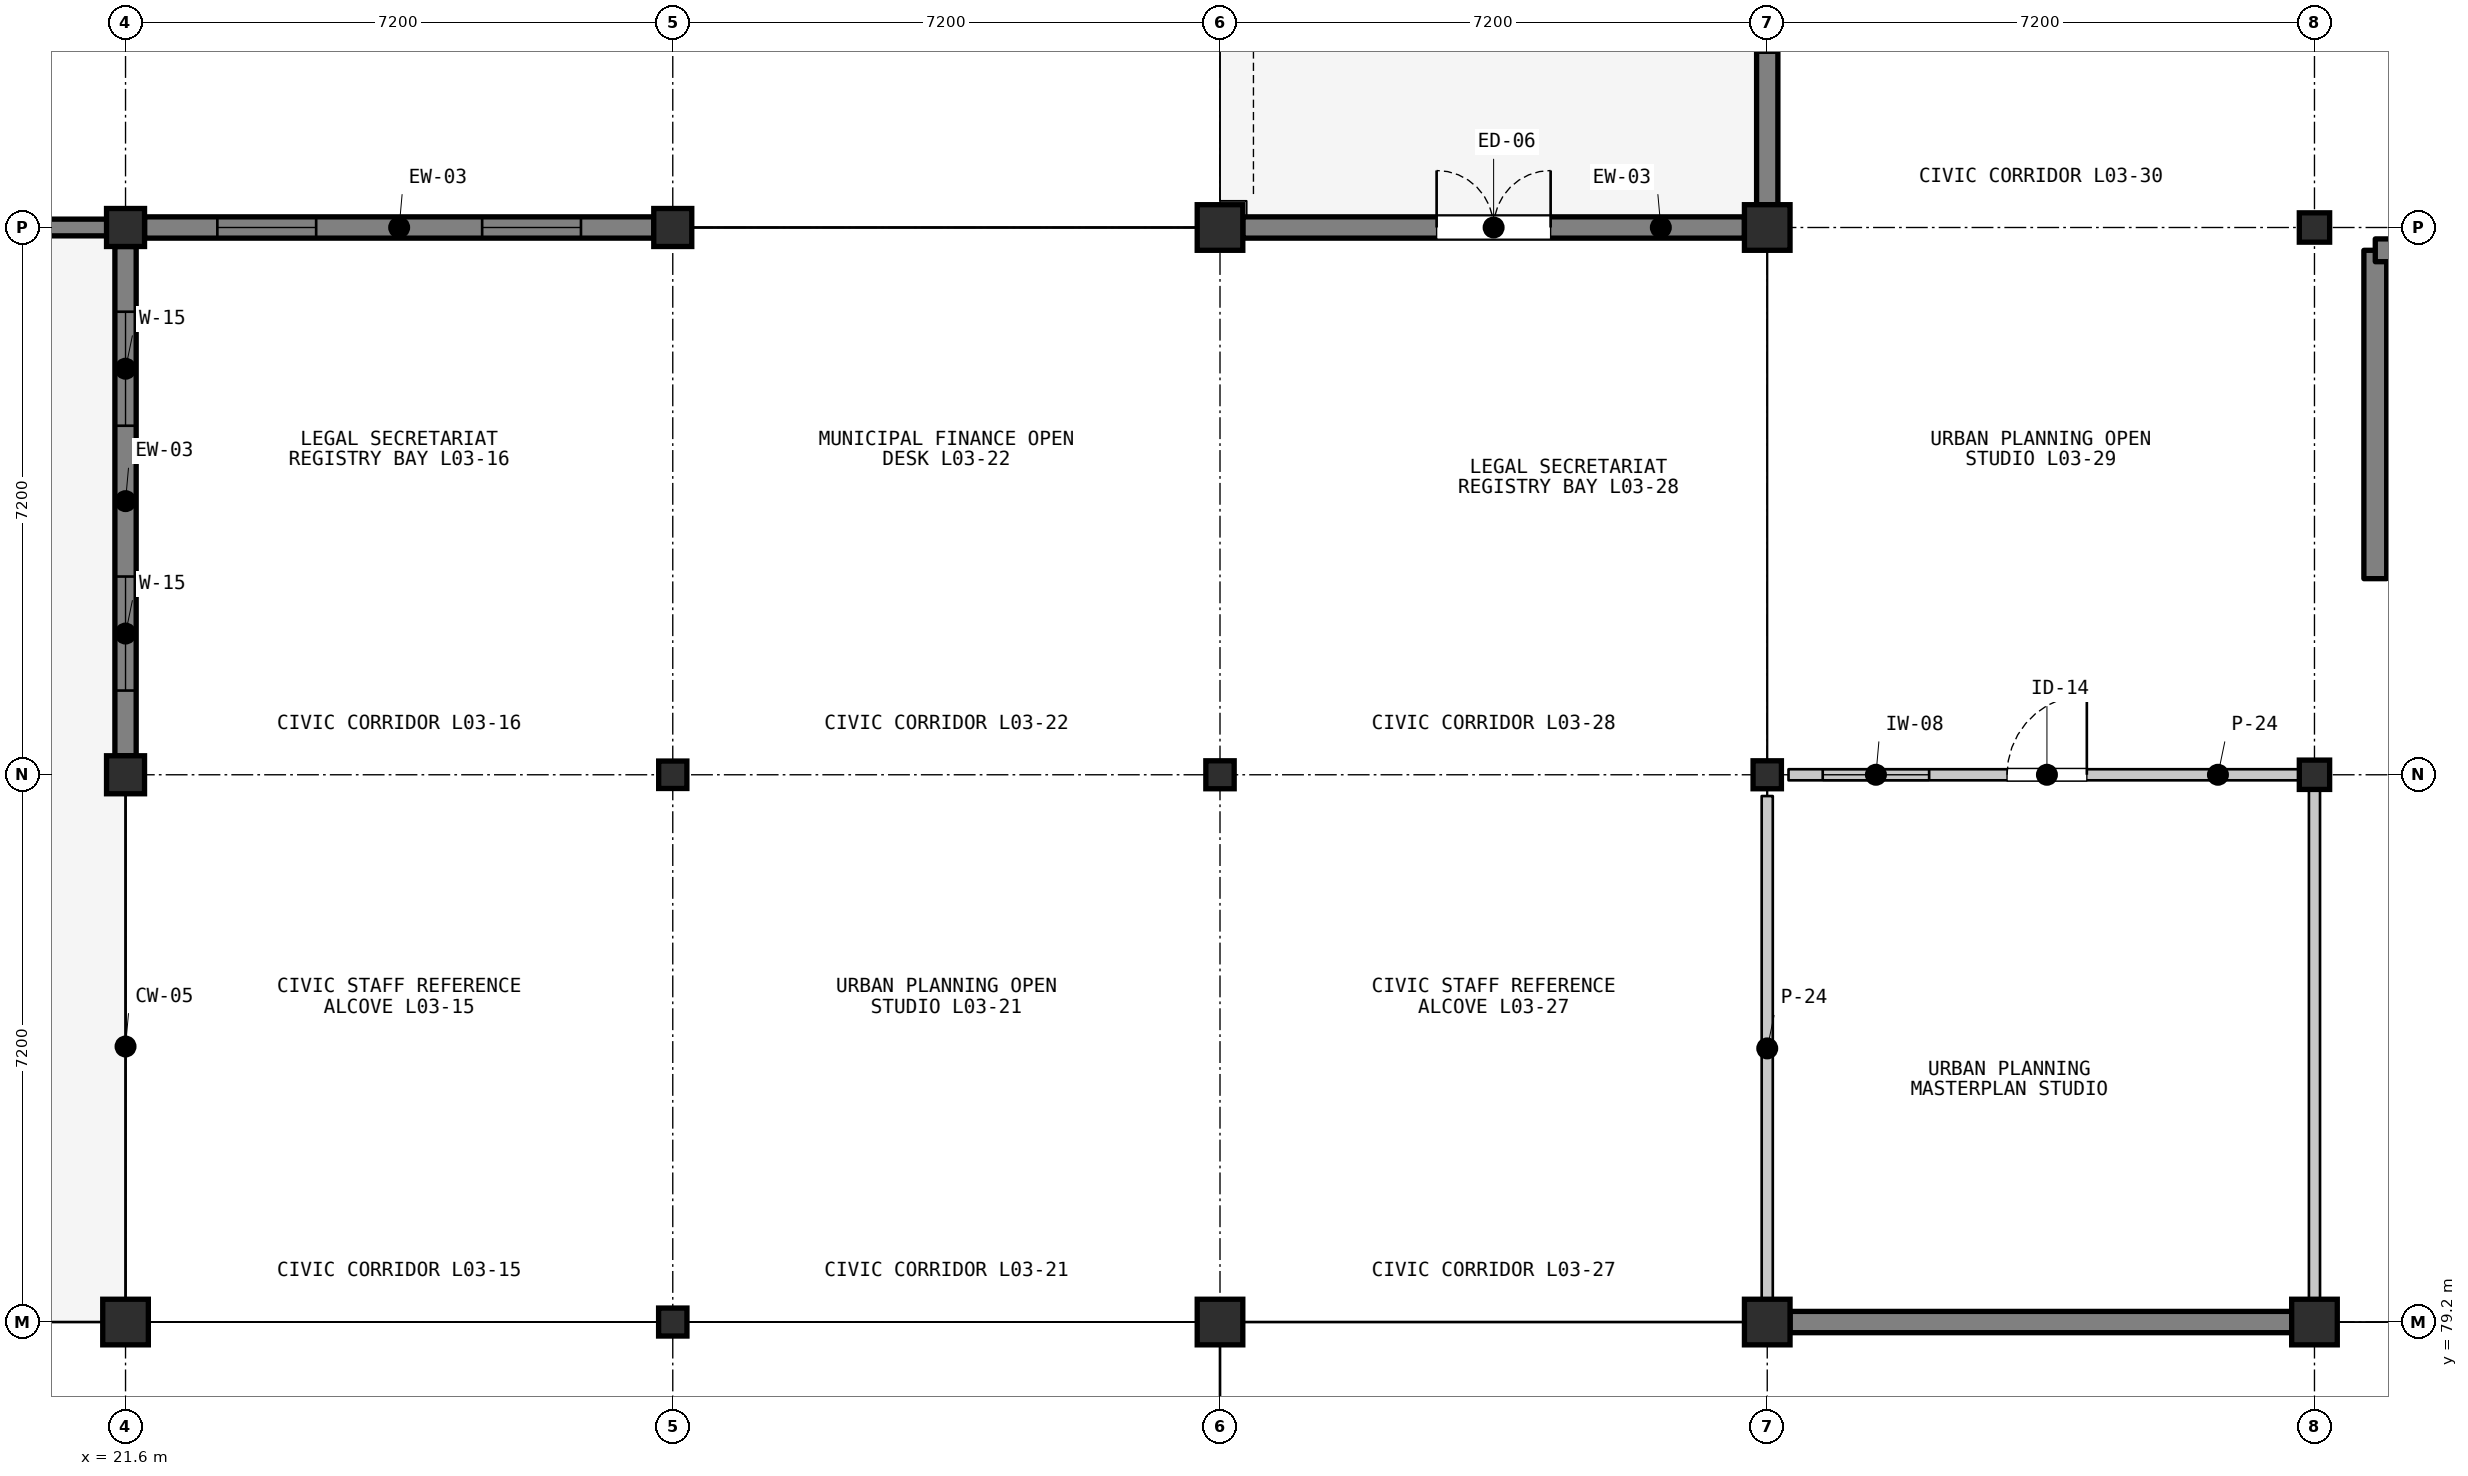
"""IFC4 building model, lengths in metres.
Left out: names, types, materials, properties, quantities, classifications, styles, units other than length and angle.
Written with IfcOpenShell. Run it as: python <this file> out.ifc"""

import sys

from ifc_helpers import new_model, si_unit, direction, frame, frame_2d, origin, origin_2d, place, context, subcontext, project, spatial, rectangle, i_section, extrude, element, fill, save


model = new_model("IFC4")
c1 = context("Model", 3, precision=1e-05, world=origin(), true_north=direction((0.0, 1.0)))
c2 = subcontext(c1, "Body", "Model", "MODEL_VIEW")
j1 = project(units=[si_unit("LENGTHUNIT", "METRE"), si_unit("PLANEANGLEUNIT", "RADIAN")], contexts=[c1])
p1 = place(None, origin())
s1 = spatial("IfcSite", under=j1, at=p1, CompositionType="ELEMENT")
p2 = place(p1, origin())
s2 = spatial("IfcBuilding", under=s1, at=p2, CompositionType="ELEMENT")
p3 = place(p2, frame((0.0, 0.0, 9.9)))
s3 = spatial("IfcBuildingStorey", under=s2, at=p3, CompositionType="ELEMENT", Elevation=9.9)
p4 = place(p3, frame((21.6, 79.2, 0.0), z_axis=(0.0, 0.0, 1.0), x_axis=(1.0, 0.0, 0.0)))
e1 = element("IfcColumn", 1, at=p4, inside=s3, PredefinedType="COLUMN", context=c2, shape_type="SweptSolid", body=[
    extrude(rectangle(XDim=0.6, YDim=0.6, at=origin_2d()), origin(), (0.0, 0.0, 1.0), 4.2),
])
for number, where, z_axis, x_axis in (
    (2, (21.6, 86.4, 0.0), (0.0, 0.0, 1.0), (1.0, 0.0, 0.0)),
    (3, (21.6, 93.6, 0.0), (0.0, 0.0, 1.0), (1.0, 0.0, 0.0)),
):
    element("IfcColumn", number, at=place(p3, frame(where, z_axis=z_axis, x_axis=x_axis)), inside=s3, PredefinedType="COLUMN", context=c2, shape_type="SweptSolid", body=[
        extrude(rectangle(XDim=0.5, YDim=0.5, at=origin_2d()), origin(), (0.0, 0.0, 1.0), 4.2),
    ])
p5 = place(p3, frame((28.8, 79.2, 0.0), z_axis=(0.0, 0.0, 1.0), x_axis=(1.0, 0.0, 0.0)))
e4 = element("IfcColumn", 4, at=p5, inside=s3, PredefinedType="COLUMN", context=c2, shape_type="SweptSolid", body=[
    extrude(i_section(OverallWidth=0.373, OverallDepth=0.368, WebThickness=0.015, FlangeThickness=0.024, FilletRadius=0.015, at=origin_2d()), origin(), (0.0, 0.0, 1.0), 4.2),
])
p6 = place(p3, frame((28.8, 86.4, 0.0), z_axis=(0.0, 0.0, 1.0), x_axis=(1.0, 0.0, 0.0)))
e5 = element("IfcColumn", 5, at=p6, inside=s3, PredefinedType="COLUMN", context=c2, shape_type="SweptSolid", body=[
    extrude(i_section(OverallWidth=0.371, OverallDepth=0.361, WebThickness=0.012, FlangeThickness=0.02, FilletRadius=0.015, at=origin_2d()), origin(), (0.0, 0.0, 1.0), 4.2),
])
p7 = place(p3, frame((28.8, 93.6, 0.0), z_axis=(0.0, 0.0, 1.0), x_axis=(1.0, 0.0, 0.0)))
e6 = element("IfcColumn", 6, at=p7, inside=s3, PredefinedType="COLUMN", context=c2, shape_type="SweptSolid", body=[
    extrude(rectangle(XDim=0.5, YDim=0.5, at=origin_2d()), origin(), (0.0, 0.0, 1.0), 4.2),
])
p8 = place(p3, frame((36.0, 79.2, 0.0), z_axis=(0.0, 0.0, 1.0), x_axis=(1.0, 0.0, 0.0)))
e7 = element("IfcColumn", 7, at=p8, inside=s3, PredefinedType="COLUMN", context=c2, shape_type="SweptSolid", body=[
    extrude(rectangle(XDim=0.6, YDim=0.6, at=origin_2d()), origin(), (0.0, 0.0, 1.0), 4.2),
])
p9 = place(p3, frame((36.0, 86.4, 0.0), z_axis=(0.0, 0.0, 1.0), x_axis=(1.0, 0.0, 0.0)))
e8 = element("IfcColumn", 8, at=p9, inside=s3, PredefinedType="COLUMN", context=c2, shape_type="SweptSolid", body=[
    extrude(i_section(OverallWidth=0.373, OverallDepth=0.368, WebThickness=0.015, FlangeThickness=0.024, FilletRadius=0.015, at=origin_2d()), origin(), (0.0, 0.0, 1.0), 4.2),
])
for number, where, z_axis, x_axis in (
    (9, (36.0, 93.6, 0.0), (0.0, 0.0, 1.0), (1.0, 0.0, 0.0)),
    (10, (43.2, 79.2, 0.0), (0.0, 0.0, 1.0), (1.0, 0.0, 0.0)),
):
    element("IfcColumn", number, at=place(p3, frame(where, z_axis=z_axis, x_axis=x_axis)), inside=s3, PredefinedType="COLUMN", context=c2, shape_type="SweptSolid", body=[
        extrude(rectangle(XDim=0.6, YDim=0.6, at=origin_2d()), origin(), (0.0, 0.0, 1.0), 4.2),
    ])
p10 = place(p3, frame((43.2, 86.4, 0.0), z_axis=(0.0, 0.0, 1.0), x_axis=(1.0, 0.0, 0.0)))
e11 = element("IfcColumn", 11, at=p10, inside=s3, PredefinedType="COLUMN", context=c2, shape_type="SweptSolid", body=[
    extrude(i_section(OverallWidth=0.373, OverallDepth=0.368, WebThickness=0.015, FlangeThickness=0.024, FilletRadius=0.015, at=origin_2d()), origin(), (0.0, 0.0, 1.0), 4.2),
])
for number, where, z_axis, x_axis in (
    (12, (43.2, 93.6, 0.0), (0.0, 0.0, 1.0), (1.0, 0.0, 0.0)),
    (13, (50.4, 79.2, 0.0), (0.0, 0.0, 1.0), (1.0, 0.0, 0.0)),
):
    element("IfcColumn", number, at=place(p3, frame(where, z_axis=z_axis, x_axis=x_axis)), inside=s3, PredefinedType="COLUMN", context=c2, shape_type="SweptSolid", body=[
        extrude(rectangle(XDim=0.6, YDim=0.6, at=origin_2d()), origin(), (0.0, 0.0, 1.0), 4.2),
    ])
for number, where, z_axis, x_axis in (
    (14, (50.4, 86.4, 0.0), (0.0, 0.0, 1.0), (1.0, 0.0, 0.0)),
    (15, (50.4, 93.6, 0.0), (0.0, 0.0, 1.0), (1.0, 0.0, 0.0)),
):
    element("IfcColumn", number, at=place(p3, frame(where, z_axis=z_axis, x_axis=x_axis)), inside=s3, PredefinedType="COLUMN", context=c2, shape_type="SweptSolid", body=[
        extrude(i_section(OverallWidth=0.399, OverallDepth=0.386, WebThickness=0.021, FlangeThickness=0.033, FilletRadius=0.015, at=origin_2d()), origin(), (0.0, 0.0, 1.0), 4.2),
    ])
p11 = place(p3, frame((21.85, 93.6, 0.0), z_axis=(0.0, 0.0, 1.0), x_axis=(1.0, 0.0, 0.0)))
e16 = element("IfcWall", 16, at=p11, inside=s3, PredefinedType="SOLIDWALL", context=c2, shape_type="SweptSolid", body=[
    extrude(rectangle(XDim=6.7, YDim=0.28, at=frame_2d((3.35, 0.0))), origin(), (0.0, 0.0, 1.0), 3.398),
])
p12 = place(p11, frame((0.958, 0.0, 0.95)))
e17 = element("IfcOpeningElement", 17, at=p12, cuts=e16, PredefinedType="OPENING", context=c2, shape_type="SweptSolid", body=[
    extrude(rectangle(XDim=1.3, YDim=2.0, at=frame_2d((0.65, 1.0))), frame((0.0, 0.15, 0.0), z_axis=(0.0, -1.0, 0.0), x_axis=(1.0, 0.0, 0.0)), (0.0, 0.0, 1.0), 0.3),
])
p13 = place(p11, frame((4.442, 0.0, 0.95)))
e18 = element("IfcOpeningElement", 18, at=p13, cuts=e16, PredefinedType="OPENING", context=c2, shape_type="SweptSolid", body=[
    extrude(rectangle(XDim=1.3, YDim=2.0, at=frame_2d((0.65, 1.0))), frame((0.0, 0.15, 0.0), z_axis=(0.0, -1.0, 0.0), x_axis=(1.0, 0.0, 0.0)), (0.0, 0.0, 1.0), 0.3),
])
p14 = place(p3, frame((21.6, 86.65, 0.0), z_axis=(0.0, 0.0, 1.0), x_axis=(0.0, 1.0, 0.0)))
e19 = element("IfcWall", 19, at=p14, inside=s3, PredefinedType="SOLIDWALL", context=c2, shape_type="SweptSolid", body=[
    extrude(rectangle(XDim=6.7, YDim=0.28, at=frame_2d((3.35, 0.0))), origin(), (0.0, 0.0, 1.0), 3.467),
])
p15 = place(p14, frame((0.858, 0.0, 0.95)))
e20 = element("IfcOpeningElement", 20, at=p15, cuts=e19, PredefinedType="OPENING", context=c2, shape_type="SweptSolid", body=[
    extrude(rectangle(XDim=1.5, YDim=1.9, at=frame_2d((0.75, 0.95))), frame((0.0, 0.15, 0.0), z_axis=(0.0, -1.0, 0.0), x_axis=(1.0, 0.0, 0.0)), (0.0, 0.0, 1.0), 0.3),
])
p16 = place(p14, frame((4.342, 0.0, 0.95)))
e21 = element("IfcOpeningElement", 21, at=p16, cuts=e19, PredefinedType="OPENING", context=c2, shape_type="SweptSolid", body=[
    extrude(rectangle(XDim=1.5, YDim=1.9, at=frame_2d((0.75, 0.95))), frame((0.0, 0.15, 0.0), z_axis=(0.0, -1.0, 0.0), x_axis=(1.0, 0.0, 0.0)), (0.0, 0.0, 1.0), 0.3),
])
p17 = place(p3, frame((36.3, 93.6, 0.0), z_axis=(0.0, 0.0, 1.0), x_axis=(1.0, 0.0, 0.0)))
e22 = element("IfcWall", 22, at=p17, inside=s3, PredefinedType="SOLIDWALL", context=c2, shape_type="SweptSolid", body=[
    extrude(rectangle(XDim=6.6, YDim=0.28, at=frame_2d((3.3, 0.0))), origin(), (0.0, 0.0, 1.0), 3.418),
])
p18 = place(p17, frame((2.55, 0.0, 0.0)))
e23 = element("IfcOpeningElement", 23, at=p18, cuts=e22, PredefinedType="OPENING", context=c2, shape_type="SweptSolid", body=[
    extrude(rectangle(XDim=1.5, YDim=2.25, at=frame_2d((0.75, 1.125))), frame((0.0, 0.15, 0.0), z_axis=(0.0, -1.0, 0.0), x_axis=(1.0, 0.0, 0.0)), (0.0, 0.0, 1.0), 0.3),
])
p19 = place(p3, frame((50.1, 79.2, 0.0), z_axis=(0.0, 0.0, 1.0), x_axis=(-1.0, 0.0, 0.0)))
e24 = element("IfcWall", 24, at=p19, inside=s3, PredefinedType="SOLIDWALL", context=c2, shape_type="SweptSolid", body=[
    extrude(rectangle(XDim=6.6, YDim=0.28, at=frame_2d((3.3, 0.0))), origin(), (0.0, 0.0, 1.0), 3.418),
])
p20 = place(p3, frame((43.2, 93.9, 0.0), z_axis=(0.0, 0.0, 1.0), x_axis=(0.0, 1.0, 0.0)))
e25 = element("IfcWall", 25, at=p20, inside=s3, PredefinedType="SOLIDWALL", context=c2, shape_type="SweptSolid", body=[
    extrude(rectangle(XDim=6.6, YDim=0.28, at=frame_2d((3.3, 0.0))), origin(), (0.0, 0.0, 1.0), 3.487),
])
p21 = place(p20, frame((2.0, 0.0, 0.95)))
e26 = element("IfcOpeningElement", 26, at=p21, cuts=e25, PredefinedType="OPENING", context=c2, shape_type="SweptSolid", body=[
    extrude(rectangle(XDim=2.6, YDim=1.9, at=frame_2d((1.3, 0.95))), frame((0.0, 0.15, 0.0), z_axis=(0.0, -1.0, 0.0), x_axis=(1.0, 0.0, 0.0)), (0.0, 0.0, 1.0), 0.3),
])
p22 = place(p3, frame((14.55, 93.6, 0.0), z_axis=(0.0, 0.0, 1.0), x_axis=(1.0, 0.0, 0.0)))
e27 = element("IfcWall", 27, at=p22, inside=s3, PredefinedType="PARAPET", context=c2, shape_type="SweptSolid", body=[
    extrude(rectangle(XDim=6.9, YDim=0.22, at=frame_2d((3.45, 0.0))), origin(), (0.0, 0.0, 1.0), 0.85),
])
p23 = place(p3, frame((51.2, 88.98, 0.0), z_axis=(0.0, 0.0, 1.0), x_axis=(0.0, 1.0, 0.0)))
e28 = element("IfcWall", 28, at=p23, inside=s3, PredefinedType="SHEAR", context=c2, shape_type="SweptSolid", body=[
    extrude(rectangle(XDim=4.32, YDim=0.3, at=frame_2d((2.16, 0.0))), origin(), (0.0, 0.0, 1.0), 4.02),
])
p24 = place(p3, frame((51.2, 93.3, 0.0), z_axis=(0.0, 0.0, 1.0), x_axis=(1.0, 0.0, 0.0)))
e29 = element("IfcWall", 29, at=p24, inside=s3, PredefinedType="SHEAR", context=c2, shape_type="SweptSolid", body=[
    extrude(rectangle(XDim=5.92, YDim=0.3, at=frame_2d((2.96, 0.0))), origin(), (0.0, 0.0, 1.0), 4.02),
])
p25 = place(p3, frame((51.35, 90.15, 0.0), z_axis=(0.0, 0.0, 1.0), x_axis=(1.0, 0.0, 0.0)))
e30 = element("IfcWall", 30, at=p25, inside=s3, PredefinedType="SHEAR", context=c2, shape_type="SweptSolid", body=[
    extrude(rectangle(XDim=2.4, YDim=0.22, at=frame_2d((1.2, 0.0))), origin(), (0.0, 0.0, 1.0), 4.02),
])
p26 = place(p3, frame((43.48, 86.4, 0.0), z_axis=(0.0, 0.0, 1.0), x_axis=(1.0, 0.0, 0.0)))
e31 = element("IfcWall", 31, at=p26, inside=s3, PredefinedType="PARTITIONING", context=c2, shape_type="SweptSolid", body=[
    extrude(rectangle(XDim=6.8, YDim=0.146, at=frame_2d((3.4, 0.0))), origin(), (0.0, 0.0, 1.0), 3.408),
])
p27 = place(p26, frame((2.875, 0.0, 0.0)))
e32 = element("IfcOpeningElement", 32, at=p27, cuts=e31, PredefinedType="OPENING", context=c2, shape_type="SweptSolid", body=[
    extrude(rectangle(XDim=1.05, YDim=2.15, at=frame_2d((0.525, 1.075))), frame((0.0, 0.083, 0.0), z_axis=(0.0, -1.0, 0.0), x_axis=(1.0, 0.0, 0.0)), (0.0, 0.0, 1.0), 0.166),
])
p28 = place(p26, frame((0.45, 0.0, 1.05)))
e33 = element("IfcOpeningElement", 33, at=p28, cuts=e31, PredefinedType="OPENING", context=c2, shape_type="SweptSolid", body=[
    extrude(rectangle(XDim=1.4, YDim=1.2, at=frame_2d((0.7, 0.6))), frame((0.0, 0.083, 0.0), z_axis=(0.0, -1.0, 0.0), x_axis=(1.0, 0.0, 0.0)), (0.0, 0.0, 1.0), 0.166),
])
p29 = place(p3, frame((43.2, 79.48, 0.0), z_axis=(0.0, 0.0, 1.0), x_axis=(0.0, 1.0, 0.0)))
e34 = element("IfcWall", 34, at=p29, inside=s3, PredefinedType="PARTITIONING", context=c2, shape_type="SweptSolid", body=[
    extrude(rectangle(XDim=6.64, YDim=0.146, at=frame_2d((3.32, 0.0))), origin(), (0.0, 0.0, 1.0), 3.477),
])
p30 = place(p3, frame((50.4, 86.28, 0.0), z_axis=(0.0, 0.0, 1.0), x_axis=(0.0, -1.0, 0.0)))
e35 = element("IfcWall", 35, at=p30, inside=s3, PredefinedType="PARTITIONING", context=c2, shape_type="SweptSolid", body=[
    extrude(rectangle(XDim=6.96, YDim=0.146, at=frame_2d((3.48, 0.0))), origin(), (0.0, 0.0, 1.0), 3.408),
])
p31 = place(p12, origin())
e36 = element("IfcWindow", 36, at=p31, inside=s3, PartitioningType="SINGLE_PANEL", PredefinedType="WINDOW", context=c2, shape_type="SweptSolid", body=[
    extrude(rectangle(XDim=1.3, YDim=2.0, at=frame_2d((0.65, 1.0))), frame((0.0, 0.03, 0.0), z_axis=(0.0, -1.0, 0.0), x_axis=(1.0, 0.0, 0.0)), (0.0, 0.0, 1.0), 0.06),
])
fill(e17, e36)
p32 = place(p13, origin())
e37 = element("IfcWindow", 37, at=p32, inside=s3, PartitioningType="SINGLE_PANEL", PredefinedType="WINDOW", context=c2, shape_type="SweptSolid", body=[
    extrude(rectangle(XDim=1.3, YDim=2.0, at=frame_2d((0.65, 1.0))), frame((0.0, 0.03, 0.0), z_axis=(0.0, -1.0, 0.0), x_axis=(1.0, 0.0, 0.0)), (0.0, 0.0, 1.0), 0.06),
])
fill(e18, e37)
p33 = place(p15, origin())
e38 = element("IfcWindow", 38, at=p33, inside=s3, PartitioningType="SINGLE_PANEL", PredefinedType="WINDOW", context=c2, shape_type="SweptSolid", body=[
    extrude(rectangle(XDim=1.5, YDim=1.9, at=frame_2d((0.75, 0.95))), frame((0.0, 0.03, 0.0), z_axis=(0.0, -1.0, 0.0), x_axis=(1.0, 0.0, 0.0)), (0.0, 0.0, 1.0), 0.06),
])
fill(e20, e38)
p34 = place(p16, origin())
e39 = element("IfcWindow", 39, at=p34, inside=s3, PartitioningType="SINGLE_PANEL", PredefinedType="WINDOW", context=c2, shape_type="SweptSolid", body=[
    extrude(rectangle(XDim=1.5, YDim=1.9, at=frame_2d((0.75, 0.95))), frame((0.0, 0.03, 0.0), z_axis=(0.0, -1.0, 0.0), x_axis=(1.0, 0.0, 0.0)), (0.0, 0.0, 1.0), 0.06),
])
fill(e21, e39)
p35 = place(p18, origin())
e40 = element("IfcDoor", 40, at=p35, inside=s3, OperationType="DOUBLE_DOOR_SINGLE_SWING", PredefinedType="DOOR", context=c2, shape_type="SweptSolid", body=[
    extrude(rectangle(XDim=1.5, YDim=2.25, at=frame_2d((0.75, 1.125))), frame((0.0, 0.025, 0.0), z_axis=(0.0, -1.0, 0.0), x_axis=(1.0, 0.0, 0.0)), (0.0, 0.0, 1.0), 0.05),
])
fill(e23, e40)
p36 = place(p21, origin())
e41 = element("IfcWindow", 41, at=p36, inside=s3, PartitioningType="SINGLE_PANEL", PredefinedType="WINDOW", context=c2, shape_type="SweptSolid", body=[
    extrude(rectangle(XDim=2.6, YDim=1.9, at=frame_2d((1.3, 0.95))), frame((0.0, 0.03, 0.0), z_axis=(0.0, -1.0, 0.0), x_axis=(1.0, 0.0, 0.0)), (0.0, 0.0, 1.0), 0.06),
])
fill(e26, e41)
p37 = place(p27, origin())
e42 = element("IfcDoor", 42, at=p37, inside=s3, OperationType="SINGLE_SWING_RIGHT", PredefinedType="DOOR", context=c2, shape_type="SweptSolid", body=[
    extrude(rectangle(XDim=1.05, YDim=2.15, at=frame_2d((0.525, 1.075))), frame((0.0, 0.025, 0.0), z_axis=(0.0, -1.0, 0.0), x_axis=(1.0, 0.0, 0.0)), (0.0, 0.0, 1.0), 0.05),
])
fill(e32, e42)
p38 = place(p28, origin())
e43 = element("IfcWindow", 43, at=p38, inside=s3, PartitioningType="SINGLE_PANEL", PredefinedType="WINDOW", context=c2, shape_type="SweptSolid", body=[
    extrude(rectangle(XDim=1.4, YDim=1.2, at=frame_2d((0.7, 0.6))), frame((0.0, 0.03, 0.0), z_axis=(0.0, -1.0, 0.0), x_axis=(1.0, 0.0, 0.0)), (0.0, 0.0, 1.0), 0.06),
])
fill(e33, e43)
save(model, sys.argv[1])
